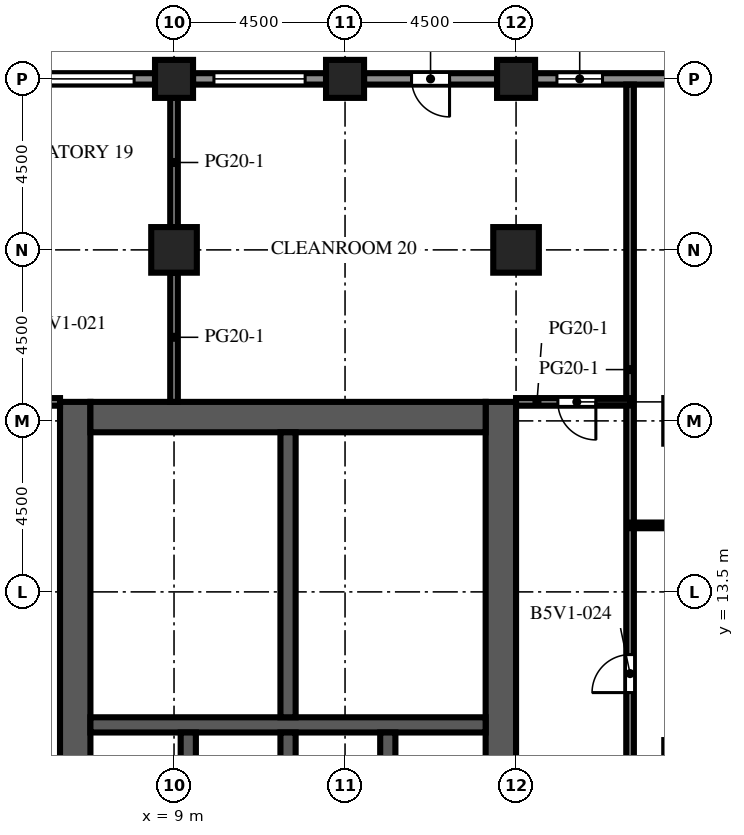
"""IFC4 building model, lengths in metres.
Left out: names, types, materials, properties, quantities, classifications, styles, units other than length and angle.
Written with IfcOpenShell. Run it as: python <this file> out.ifc"""

import sys

from ifc_helpers import new_model, si_unit, direction, frame, frame_2d, origin, origin_2d, place, context, subcontext, project, spatial, rectangle, extrude, element, fill, save


model = new_model("IFC4")
c1 = context("Model", 3, precision=1e-05, world=origin(), true_north=direction((0.0, 1.0)))
c2 = subcontext(c1, "Body", "Model", "MODEL_VIEW")
j1 = project(units=[si_unit("LENGTHUNIT", "METRE"), si_unit("PLANEANGLEUNIT", "RADIAN")], contexts=[c1])
p1 = place(None, origin())
s1 = spatial("IfcSite", under=j1, at=p1, CompositionType="ELEMENT")
p2 = place(p1, origin())
s2 = spatial("IfcBuilding", under=s1, at=p2, CompositionType="ELEMENT")
p3 = place(p2, frame((0.0, 0.0, 169.1)))
s3 = spatial("IfcBuildingStorey", under=s2, at=p3, CompositionType="ELEMENT", Elevation=169.1)
for number, where, z_axis, x_axis in (
    (1, (9.0, 27.0, 0.0), (0.0, 0.0, 1.0), (1.0, 0.0, 0.0)),
    (2, (13.5, 27.0, 0.0), (0.0, 0.0, 1.0), (1.0, 0.0, 0.0)),
    (3, (18.0, 27.0, 0.0), (0.0, 0.0, 1.0), (1.0, 0.0, 0.0)),
):
    element("IfcColumn", number, at=place(p3, frame(where, z_axis=z_axis, x_axis=x_axis)), inside=s3, PredefinedType="COLUMN", context=c2, shape_type="SweptSolid", body=[
        extrude(rectangle(XDim=1.0, YDim=1.0, at=origin_2d()), origin(), (0.0, 0.0, 1.0), 4.1),
    ])
for number, where, z_axis, x_axis in (
    (4, (9.0, 22.5, 0.0), (0.0, 0.0, 1.0), (1.0, 0.0, 0.0)),
    (5, (18.0, 22.5, 0.0), (0.0, 0.0, 1.0), (1.0, 0.0, 0.0)),
):
    element("IfcColumn", number, at=place(p3, frame(where, z_axis=z_axis, x_axis=x_axis)), inside=s3, PredefinedType="COLUMN", context=c2, shape_type="SweptSolid", body=[
        extrude(rectangle(XDim=1.2, YDim=1.2, at=origin_2d()), origin(), (0.0, 0.0, 1.0), 4.1),
    ])
p4 = place(p3, frame((6.4, -9.0, 0.0), z_axis=(0.0, 0.0, 1.0), x_axis=(0.0, 1.0, 0.0)))
e6 = element("IfcWall", 6, at=p4, inside=s3, PredefinedType="SHEAR", context=c2, shape_type="SweptSolid", body=[
    extrude(rectangle(XDim=27.5, YDim=0.8, at=frame_2d((13.75, 0.0))), origin(), (0.0, 0.0, 1.0), 4.1),
])
p5 = place(p4, frame((12.55, 0.0, 0.0)))
e7 = element("IfcOpeningElement", 7, at=p5, cuts=e6, PredefinedType="OPENING", context=c2, shape_type="SweptSolid", body=[
    extrude(rectangle(XDim=2.4, YDim=2.4, at=frame_2d((1.2, 1.2))), frame((0.0, 0.41, 0.0), z_axis=(0.0, -1.0, 0.0), x_axis=(1.0, 0.0, 0.0)), (0.0, 0.0, 1.0), 0.82),
])
p6 = place(p4, frame((3.95, 0.0, 0.0)))
e8 = element("IfcOpeningElement", 8, at=p6, cuts=e6, PredefinedType="OPENING", context=c2, shape_type="SweptSolid", body=[
    extrude(rectangle(XDim=1.2, YDim=2.1, at=frame_2d((0.6, 1.05))), frame((0.0, 0.41, 0.0), z_axis=(0.0, -1.0, 0.0), x_axis=(1.0, 0.0, 0.0)), (0.0, 0.0, 1.0), 0.82),
])
p7 = place(p4, frame((22.35, 0.0, 0.0)))
e9 = element("IfcOpeningElement", 9, at=p7, cuts=e6, PredefinedType="OPENING", context=c2, shape_type="SweptSolid", body=[
    extrude(rectangle(XDim=1.2, YDim=2.1, at=frame_2d((0.6, 1.05))), frame((0.0, 0.41, 0.0), z_axis=(0.0, -1.0, 0.0), x_axis=(1.0, 0.0, 0.0)), (0.0, 0.0, 1.0), 0.82),
])
p8 = place(p3, frame((17.6, -9.0, 0.0), z_axis=(0.0, 0.0, 1.0), x_axis=(0.0, 1.0, 0.0)))
e10 = element("IfcWall", 10, at=p8, inside=s3, PredefinedType="SHEAR", context=c2, shape_type="SweptSolid", body=[
    extrude(rectangle(XDim=27.5, YDim=0.8, at=frame_2d((13.75, 0.0))), origin(), (0.0, 0.0, 1.0), 4.1),
])
p9 = place(p8, frame((12.55, 0.0, 0.0)))
e11 = element("IfcOpeningElement", 11, at=p9, cuts=e10, PredefinedType="OPENING", context=c2, shape_type="SweptSolid", body=[
    extrude(rectangle(XDim=2.4, YDim=2.4, at=frame_2d((1.2, 1.2))), frame((0.0, 0.41, 0.0), z_axis=(0.0, -1.0, 0.0), x_axis=(1.0, 0.0, 0.0)), (0.0, 0.0, 1.0), 0.82),
])
p10 = place(p8, frame((6.825, 0.0, 0.0)))
e12 = element("IfcOpeningElement", 12, at=p10, cuts=e10, PredefinedType="OPENING", context=c2, shape_type="SweptSolid", body=[
    extrude(rectangle(XDim=1.2, YDim=2.1, at=frame_2d((0.6, 1.05))), frame((0.0, 0.41, 0.0), z_axis=(0.0, -1.0, 0.0), x_axis=(1.0, 0.0, 0.0)), (0.0, 0.0, 1.0), 0.82),
])
p11 = place(p8, frame((19.475, 0.0, 0.0)))
e13 = element("IfcOpeningElement", 13, at=p11, cuts=e10, PredefinedType="OPENING", context=c2, shape_type="SweptSolid", body=[
    extrude(rectangle(XDim=1.2, YDim=2.1, at=frame_2d((0.6, 1.05))), frame((0.0, 0.41, 0.0), z_axis=(0.0, -1.0, 0.0), x_axis=(1.0, 0.0, 0.0)), (0.0, 0.0, 1.0), 0.82),
])
p12 = place(p3, frame((6.8, 18.1, 0.0), z_axis=(0.0, 0.0, 1.0), x_axis=(1.0, 0.0, 0.0)))
e14 = element("IfcWall", 14, at=p12, inside=s3, PredefinedType="SHEAR", context=c2, shape_type="SweptSolid", body=[
    extrude(rectangle(XDim=10.4, YDim=0.8, at=frame_2d((5.2, 0.0))), origin(), (0.0, 0.0, 1.0), 4.1),
])
p13 = place(p3, frame((6.8, 10.0, 0.0), z_axis=(0.0, 0.0, 1.0), x_axis=(1.0, 0.0, 0.0)))
e15 = element("IfcWall", 15, at=p13, inside=s3, PredefinedType="SHEAR", context=c2, shape_type="SweptSolid", body=[
    extrude(rectangle(XDim=10.4, YDim=0.4, at=frame_2d((5.2, 0.0))), origin(), (0.0, 0.0, 1.0), 4.1),
])
for number, where, z_axis, x_axis in (
    (16, (9.375, 6.9, 0.0), (0.0, 0.0, 1.0), (0.0, 1.0, 0.0)),
    (17, (12.0, 6.9, 0.0), (0.0, 0.0, 1.0), (0.0, 1.0, 0.0)),
    (18, (14.625, 6.9, 0.0), (0.0, 0.0, 1.0), (0.0, 1.0, 0.0)),
):
    element("IfcWall", number, at=place(p3, frame(where, z_axis=z_axis, x_axis=x_axis)), inside=s3, PredefinedType="SHEAR", context=c2, shape_type="SweptSolid", body=[
        extrude(rectangle(XDim=2.9, YDim=0.4, at=frame_2d((1.45, 0.0))), origin(), (0.0, 0.0, 1.0), 4.1),
    ])
p14 = place(p3, frame((12.0, 10.2, 0.0), z_axis=(0.0, 0.0, 1.0), x_axis=(0.0, 1.0, 0.0)))
e19 = element("IfcWall", 19, at=p14, inside=s3, PredefinedType="SHEAR", context=c2, shape_type="SweptSolid", body=[
    extrude(rectangle(XDim=7.5, YDim=0.4, at=frame_2d((3.75, 0.0))), origin(), (0.0, 0.0, 1.0), 4.1),
])
p15 = place(p3, frame((18.5, 27.0, 0.0), z_axis=(0.0, 0.0, 1.0), x_axis=(1.0, 0.0, 0.0)))
e20 = element("IfcWall", 20, at=p15, inside=s3, PredefinedType="SOLIDWALL", context=c2, shape_type="SweptSolid", body=[
    extrude(rectangle(XDim=3.5, YDim=0.3, at=frame_2d((1.75, 0.0))), origin(), (0.0, 0.0, 1.0), 2.85),
])
p16 = place(p15, frame((0.575, 0.0, 0.8)))
e21 = element("IfcOpeningElement", 21, at=p16, cuts=e20, PredefinedType="OPENING", context=c2, shape_type="SweptSolid", body=[
    extrude(rectangle(XDim=1.2, YDim=1.7, at=frame_2d((0.6, 0.85))), frame((0.0, 0.16, 0.0), z_axis=(0.0, -1.0, 0.0), x_axis=(1.0, 0.0, 0.0)), (0.0, 0.0, 1.0), 0.32),
])
p17 = place(p3, frame((14.0, 27.0, 0.0), z_axis=(0.0, 0.0, 1.0), x_axis=(1.0, 0.0, 0.0)))
e22 = element("IfcWall", 22, at=p17, inside=s3, PredefinedType="SOLIDWALL", context=c2, shape_type="SweptSolid", body=[
    extrude(rectangle(XDim=3.5, YDim=0.3, at=frame_2d((1.75, 0.0))), origin(), (0.0, 0.0, 1.0), 2.85),
])
p18 = place(p17, frame((1.25, 0.0, 0.0)))
e23 = element("IfcOpeningElement", 23, at=p18, cuts=e22, PredefinedType="OPENING", context=c2, shape_type="SweptSolid", body=[
    extrude(rectangle(XDim=1.0, YDim=2.2, at=frame_2d((0.5, 1.1))), frame((0.0, 0.16, 0.0), z_axis=(0.0, -1.0, 0.0), x_axis=(1.0, 0.0, 0.0)), (0.0, 0.0, 1.0), 0.32),
])
p19 = place(p3, frame((9.5, 27.0, 0.0), z_axis=(0.0, 0.0, 1.0), x_axis=(1.0, 0.0, 0.0)))
e24 = element("IfcWall", 24, at=p19, inside=s3, PredefinedType="SOLIDWALL", context=c2, shape_type="SweptSolid", body=[
    extrude(rectangle(XDim=3.5, YDim=0.3, at=frame_2d((1.75, 0.0))), origin(), (0.0, 0.0, 1.0), 2.85),
])
p20 = place(p19, frame((0.55, 0.0, 0.8)))
e25 = element("IfcOpeningElement", 25, at=p20, cuts=e24, PredefinedType="OPENING", context=c2, shape_type="SweptSolid", body=[
    extrude(rectangle(XDim=2.4, YDim=1.7, at=frame_2d((1.2, 0.85))), frame((0.0, 0.16, 0.0), z_axis=(0.0, -1.0, 0.0), x_axis=(1.0, 0.0, 0.0)), (0.0, 0.0, 1.0), 0.32),
])
p21 = place(p3, frame((5.0, 27.0, 0.0), z_axis=(0.0, 0.0, 1.0), x_axis=(1.0, 0.0, 0.0)))
e26 = element("IfcWall", 26, at=p21, inside=s3, PredefinedType="SOLIDWALL", context=c2, shape_type="SweptSolid", body=[
    extrude(rectangle(XDim=3.5, YDim=0.3, at=frame_2d((1.75, 0.0))), origin(), (0.0, 0.0, 1.0), 2.85),
])
p22 = place(p21, frame((0.55, 0.0, 0.8)))
e27 = element("IfcOpeningElement", 27, at=p22, cuts=e26, PredefinedType="OPENING", context=c2, shape_type="SweptSolid", body=[
    extrude(rectangle(XDim=2.4, YDim=1.7, at=frame_2d((1.2, 0.85))), frame((0.0, 0.16, 0.0), z_axis=(0.0, -1.0, 0.0), x_axis=(1.0, 0.0, 0.0)), (0.0, 0.0, 1.0), 0.32),
])
p23 = place(p3, frame((8.2, 10.2, 0.0), z_axis=(0.0, 0.0, 1.0), x_axis=(0.0, 1.0, 0.0)))
e28 = element("IfcWall", 28, at=p23, inside=s3, PredefinedType="PARTITIONING", context=c2, shape_type="SweptSolid", body=[
    extrude(rectangle(XDim=2.25, YDim=0.1, at=frame_2d((1.125, 0.0))), origin(), (0.0, 0.0, 1.0), 3.65),
])
p24 = place(p23, frame((0.625, 0.0, 0.0)))
e29 = element("IfcOpeningElement", 29, at=p24, cuts=e28, PredefinedType="OPENING", context=c2, shape_type="SweptSolid", body=[
    extrude(rectangle(XDim=1.0, YDim=2.1, at=frame_2d((0.5, 1.05))), frame((0.0, 0.06, 0.0), z_axis=(0.0, -1.0, 0.0), x_axis=(1.0, 0.0, 0.0)), (0.0, 0.0, 1.0), 0.12),
])
p25 = place(p3, frame((8.2, 12.45, 0.0), z_axis=(0.0, 0.0, 1.0), x_axis=(0.0, 1.0, 0.0)))
e30 = element("IfcWall", 30, at=p25, inside=s3, PredefinedType="PARTITIONING", context=c2, shape_type="SweptSolid", body=[
    extrude(rectangle(XDim=2.4, YDim=0.1, at=frame_2d((1.2, 0.0))), origin(), (0.0, 0.0, 1.0), 3.65),
])
p26 = place(p25, frame((0.7, 0.0, 0.0)))
e31 = element("IfcOpeningElement", 31, at=p26, cuts=e30, PredefinedType="OPENING", context=c2, shape_type="SweptSolid", body=[
    extrude(rectangle(XDim=1.0, YDim=2.1, at=frame_2d((0.5, 1.05))), frame((0.0, 0.06, 0.0), z_axis=(0.0, -1.0, 0.0), x_axis=(1.0, 0.0, 0.0)), (0.0, 0.0, 1.0), 0.12),
])
p27 = place(p3, frame((8.2, 14.85, 0.0), z_axis=(0.0, 0.0, 1.0), x_axis=(0.0, 1.0, 0.0)))
e32 = element("IfcWall", 32, at=p27, inside=s3, PredefinedType="PARTITIONING", context=c2, shape_type="SweptSolid", body=[
    extrude(rectangle(XDim=2.85, YDim=0.1, at=frame_2d((1.425, 0.0))), origin(), (0.0, 0.0, 1.0), 3.65),
])
p28 = place(p27, frame((0.925, 0.0, 0.0)))
e33 = element("IfcOpeningElement", 33, at=p28, cuts=e32, PredefinedType="OPENING", context=c2, shape_type="SweptSolid", body=[
    extrude(rectangle(XDim=1.0, YDim=2.1, at=frame_2d((0.5, 1.05))), frame((0.0, 0.06, 0.0), z_axis=(0.0, -1.0, 0.0), x_axis=(1.0, 0.0, 0.0)), (0.0, 0.0, 1.0), 0.12),
])
for number, where, z_axis, x_axis in (
    (34, (8.2, 12.45, 0.0), (0.0, 0.0, 1.0), (1.0, 0.0, 0.0)),
    (35, (8.2, 14.85, 0.0), (0.0, 0.0, 1.0), (1.0, 0.0, 0.0)),
):
    element("IfcWall", number, at=place(p3, frame(where, z_axis=z_axis, x_axis=x_axis)), inside=s3, PredefinedType="PARTITIONING", context=c2, shape_type="SweptSolid", body=[
        extrude(rectangle(XDim=3.6, YDim=0.1, at=frame_2d((1.8, 0.0))), origin(), (0.0, 0.0, 1.0), 3.65),
    ])
for number, where, z_axis, x_axis in (
    (36, (9.0, 18.5, 0.0), (0.0, 0.0, 1.0), (0.0, 1.0, 0.0)),
    (37, (9.0, 23.1, 0.0), (0.0, 0.0, 1.0), (0.0, 1.0, 0.0)),
):
    element("IfcWall", number, at=place(p3, frame(where, z_axis=z_axis, x_axis=x_axis)), inside=s3, PredefinedType="PARTITIONING", context=c2, shape_type="SweptSolid", body=[
        extrude(rectangle(XDim=3.4, YDim=0.2, at=frame_2d((1.7, 0.0))), origin(), (0.0, 0.0, 1.0), 3.65),
    ])
p29 = place(p3, frame((21.0, 26.85, 0.0), z_axis=(0.0, 0.0, 1.0), x_axis=(0.0, -1.0, 0.0)))
e38 = element("IfcWall", 38, at=p29, inside=s3, PredefinedType="PARTITIONING", context=c2, shape_type="SweptSolid", body=[
    extrude(rectangle(XDim=20.6, YDim=0.2, at=frame_2d((10.3, 0.0))), origin(), (0.0, 0.0, 1.0), 3.65),
])
p30 = place(p29, frame((15.0, 0.0, 0.0)))
e39 = element("IfcOpeningElement", 39, at=p30, cuts=e38, PredefinedType="OPENING", context=c2, shape_type="SweptSolid", body=[
    extrude(rectangle(XDim=1.0, YDim=2.1, at=frame_2d((0.5, 1.05))), frame((0.0, 0.11, 0.0), z_axis=(0.0, -1.0, 0.0), x_axis=(1.0, 0.0, 0.0)), (0.0, 0.0, 1.0), 0.22),
])
p31 = place(p3, frame((21.0, 15.25, 0.0), z_axis=(0.0, 0.0, 1.0), x_axis=(1.0, 0.0, 0.0)))
e40 = element("IfcWall", 40, at=p31, inside=s3, PredefinedType="PARTITIONING", context=c2, shape_type="SweptSolid", body=[
    extrude(rectangle(XDim=5.85, YDim=0.15, at=frame_2d((2.925, 0.0))), origin(), (0.0, 0.0, 1.0), 3.65),
])
p32 = place(p31, frame((3.1, 0.0, 0.0)))
e41 = element("IfcOpeningElement", 41, at=p32, cuts=e40, PredefinedType="OPENING", context=c2, shape_type="SweptSolid", body=[
    extrude(rectangle(XDim=1.0, YDim=2.1, at=frame_2d((0.5, 1.05))), frame((0.0, 0.085, 0.0), z_axis=(0.0, -1.0, 0.0), x_axis=(1.0, 0.0, 0.0)), (0.0, 0.0, 1.0), 0.17),
])
p33 = place(p3, frame((1.5, 18.5, 0.0), z_axis=(0.0, 0.0, 1.0), x_axis=(1.0, 0.0, 0.0)))
e42 = element("IfcWall", 42, at=p33, inside=s3, PredefinedType="PARTITIONING", context=c2, shape_type="SweptSolid", body=[
    extrude(rectangle(XDim=4.5, YDim=0.2, at=frame_2d((2.25, 0.0))), origin(), (0.0, 0.0, 1.0), 3.65),
])
p34 = place(p33, frame((2.1, 0.0, 0.0)))
e43 = element("IfcOpeningElement", 43, at=p34, cuts=e42, PredefinedType="OPENING", context=c2, shape_type="SweptSolid", body=[
    extrude(rectangle(XDim=1.0, YDim=2.1, at=frame_2d((0.5, 1.05))), frame((0.0, 0.11, 0.0), z_axis=(0.0, -1.0, 0.0), x_axis=(1.0, 0.0, 0.0)), (0.0, 0.0, 1.0), 0.22),
])
p35 = place(p3, frame((18.0, 18.5, 0.0), z_axis=(0.0, 0.0, 1.0), x_axis=(1.0, 0.0, 0.0)))
e44 = element("IfcWall", 44, at=p35, inside=s3, PredefinedType="PARTITIONING", context=c2, shape_type="SweptSolid", body=[
    extrude(rectangle(XDim=3.0, YDim=0.2, at=frame_2d((1.5, 0.0))), origin(), (0.0, 0.0, 1.0), 3.65),
])
p36 = place(p35, frame((1.1, 0.0, 0.0)))
e45 = element("IfcOpeningElement", 45, at=p36, cuts=e44, PredefinedType="OPENING", context=c2, shape_type="SweptSolid", body=[
    extrude(rectangle(XDim=1.0, YDim=2.1, at=frame_2d((0.5, 1.05))), frame((0.0, 0.11, 0.0), z_axis=(0.0, -1.0, 0.0), x_axis=(1.0, 0.0, 0.0)), (0.0, 0.0, 1.0), 0.22),
])
p37 = place(p16, origin())
e46 = element("IfcWindow", 46, at=p37, inside=s3, PartitioningType="SINGLE_PANEL", PredefinedType="WINDOW", context=c2, shape_type="SweptSolid", body=[
    extrude(rectangle(XDim=1.2, YDim=1.7, at=frame_2d((0.6, 0.85))), frame((0.0, 0.03, 0.0), z_axis=(0.0, -1.0, 0.0), x_axis=(1.0, 0.0, 0.0)), (0.0, 0.0, 1.0), 0.06),
])
fill(e21, e46)
p38 = place(p18, origin())
e47 = element("IfcDoor", 47, at=p38, inside=s3, OperationType="SINGLE_SWING_RIGHT", PredefinedType="DOOR", context=c2, shape_type="SweptSolid", body=[
    extrude(rectangle(XDim=1.0, YDim=2.2, at=frame_2d((0.5, 1.1))), frame((0.0, 0.025, 0.0), z_axis=(0.0, -1.0, 0.0), x_axis=(1.0, 0.0, 0.0)), (0.0, 0.0, 1.0), 0.05),
])
fill(e23, e47)
p39 = place(p20, origin())
e48 = element("IfcWindow", 48, at=p39, inside=s3, PartitioningType="SINGLE_PANEL", PredefinedType="WINDOW", context=c2, shape_type="SweptSolid", body=[
    extrude(rectangle(XDim=2.4, YDim=1.7, at=frame_2d((1.2, 0.85))), frame((0.0, 0.03, 0.0), z_axis=(0.0, -1.0, 0.0), x_axis=(1.0, 0.0, 0.0)), (0.0, 0.0, 1.0), 0.06),
])
fill(e25, e48)
p40 = place(p22, origin())
e49 = element("IfcWindow", 49, at=p40, inside=s3, PartitioningType="SINGLE_PANEL", PredefinedType="WINDOW", context=c2, shape_type="SweptSolid", body=[
    extrude(rectangle(XDim=2.4, YDim=1.7, at=frame_2d((1.2, 0.85))), frame((0.0, 0.03, 0.0), z_axis=(0.0, -1.0, 0.0), x_axis=(1.0, 0.0, 0.0)), (0.0, 0.0, 1.0), 0.06),
])
fill(e27, e49)
p41 = place(p11, frame((1.2, 0.0, 0.0), z_axis=(0.0, 0.0, 1.0), x_axis=(-1.0, 0.0, 0.0)))
e50 = element("IfcDoor", 50, at=p41, inside=s3, OperationType="SINGLE_SWING_LEFT", PredefinedType="DOOR", context=c2, shape_type="SweptSolid", body=[
    extrude(rectangle(XDim=1.2, YDim=2.1, at=frame_2d((0.6, 1.05))), frame((0.0, 0.025, 0.0), z_axis=(0.0, -1.0, 0.0), x_axis=(1.0, 0.0, 0.0)), (0.0, 0.0, 1.0), 0.05),
])
fill(e13, e50)
p42 = place(p7, origin())
e51 = element("IfcDoor", 51, at=p42, inside=s3, OperationType="SINGLE_SWING_RIGHT", PredefinedType="DOOR", context=c2, shape_type="SweptSolid", body=[
    extrude(rectangle(XDim=1.2, YDim=2.1, at=frame_2d((0.6, 1.05))), frame((0.0, -0.325, 0.0), z_axis=(0.0, -1.0, 0.0), x_axis=(1.0, 0.0, 0.0)), (0.0, 0.0, 1.0), 0.05),
])
fill(e9, e51)
p43 = place(p24, origin())
e52 = element("IfcDoor", 52, at=p43, inside=s3, OperationType="SINGLE_SWING_LEFT", PredefinedType="DOOR", context=c2, shape_type="SweptSolid", body=[
    extrude(rectangle(XDim=1.0, YDim=2.1, at=frame_2d((0.5, 1.05))), frame((0.0, 0.025, 0.0), z_axis=(0.0, -1.0, 0.0), x_axis=(1.0, 0.0, 0.0)), (0.0, 0.0, 1.0), 0.05),
])
fill(e29, e52)
p44 = place(p26, origin())
e53 = element("IfcDoor", 53, at=p44, inside=s3, OperationType="SINGLE_SWING_RIGHT", PredefinedType="DOOR", context=c2, shape_type="SweptSolid", body=[
    extrude(rectangle(XDim=1.0, YDim=2.1, at=frame_2d((0.5, 1.05))), frame((0.0, 0.025, 0.0), z_axis=(0.0, -1.0, 0.0), x_axis=(1.0, 0.0, 0.0)), (0.0, 0.0, 1.0), 0.05),
])
fill(e31, e53)
p45 = place(p28, origin())
e54 = element("IfcDoor", 54, at=p45, inside=s3, OperationType="SINGLE_SWING_LEFT", PredefinedType="DOOR", context=c2, shape_type="SweptSolid", body=[
    extrude(rectangle(XDim=1.0, YDim=2.1, at=frame_2d((0.5, 1.05))), frame((0.0, 0.025, 0.0), z_axis=(0.0, -1.0, 0.0), x_axis=(1.0, 0.0, 0.0)), (0.0, 0.0, 1.0), 0.05),
])
fill(e33, e54)
p46 = place(p36, origin())
e55 = element("IfcDoor", 55, at=p46, inside=s3, OperationType="SINGLE_SWING_RIGHT", PredefinedType="DOOR", context=c2, shape_type="SweptSolid", body=[
    extrude(rectangle(XDim=1.0, YDim=2.1, at=frame_2d((0.5, 1.05))), frame((0.0, 0.025, 0.0), z_axis=(0.0, -1.0, 0.0), x_axis=(1.0, 0.0, 0.0)), (0.0, 0.0, 1.0), 0.05),
])
fill(e45, e55)
p47 = place(p30, origin())
e56 = element("IfcDoor", 56, at=p47, inside=s3, OperationType="SINGLE_SWING_RIGHT", PredefinedType="DOOR", context=c2, shape_type="SweptSolid", body=[
    extrude(rectangle(XDim=1.0, YDim=2.1, at=frame_2d((0.5, 1.05))), frame((0.0, 0.025, 0.0), z_axis=(0.0, -1.0, 0.0), x_axis=(1.0, 0.0, 0.0)), (0.0, 0.0, 1.0), 0.05),
])
fill(e39, e56)
save(model, sys.argv[1])
